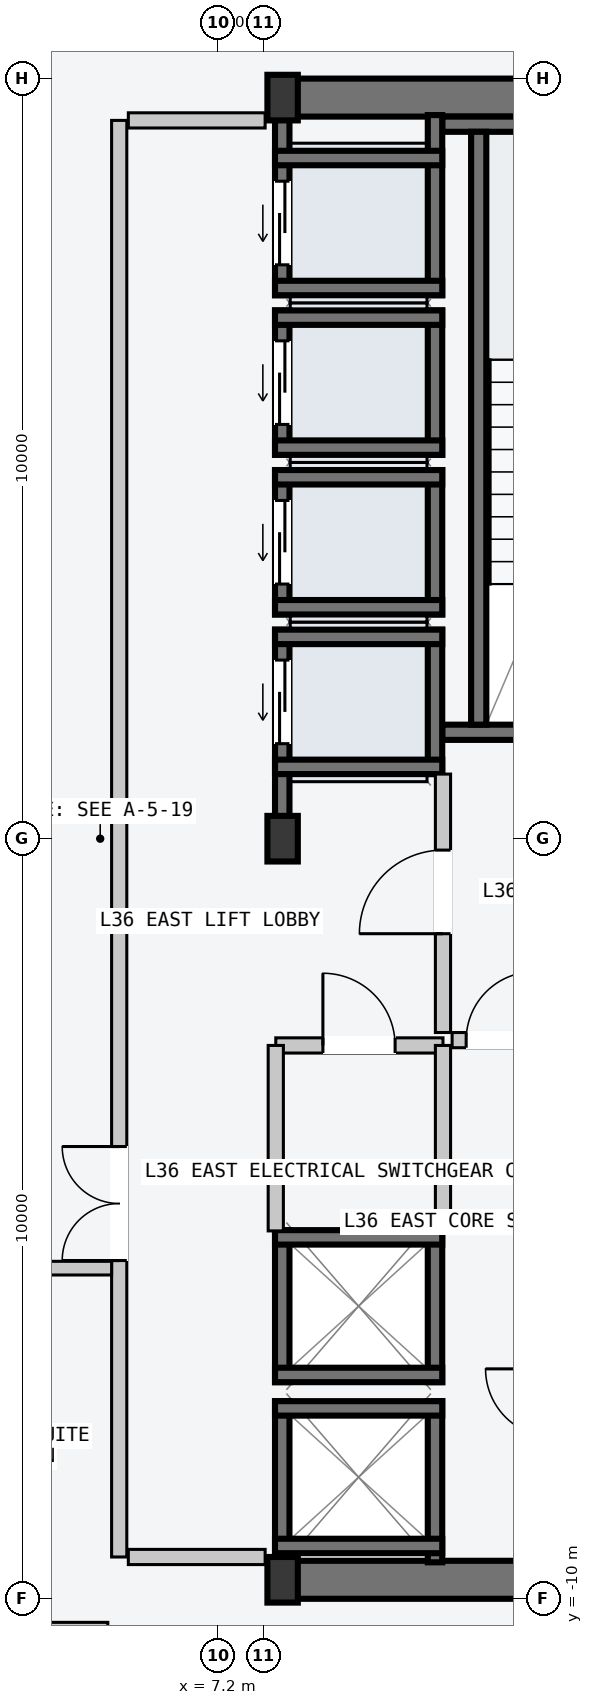
"""IFC4 building model, lengths in metres.
Left out: names, types, materials, properties, quantities, classifications, styles, units other than length and angle.
Written with IfcOpenShell. Run it as: python <this file> out.ifc"""

import sys

from ifc_helpers import new_model, si_unit, direction, frame, frame_2d, origin, origin_2d, place, context, subcontext, project, spatial, rectangle, i_section, extrude, element, fill, save


model = new_model("IFC4")
c1 = context("Model", 3, precision=1e-05, world=origin(), true_north=direction((0.0, 1.0)))
c2 = subcontext(c1, "Body", "Model", "MODEL_VIEW")
j1 = project(units=[si_unit("LENGTHUNIT", "METRE"), si_unit("PLANEANGLEUNIT", "RADIAN")], contexts=[c1])
p1 = place(None, origin())
s1 = spatial("IfcSite", under=j1, at=p1, CompositionType="ELEMENT")
p2 = place(p1, origin())
s2 = spatial("IfcBuilding", under=s1, at=p2, CompositionType="ELEMENT")
p3 = place(p2, frame((0.0, 0.0, 138.6)))
s3 = spatial("IfcBuildingStorey", under=s2, at=p3, CompositionType="ELEMENT", Elevation=138.6)
for number, where, z_axis, x_axis in (
    (1, (8.07, -9.75, -0.2), (0.0, 0.0, 1.0), (1.0, 0.0, 0.0)),
    (2, (8.07, 9.75, -0.2), (0.0, 0.0, 1.0), (1.0, 0.0, 0.0)),
):
    element("IfcWall", number, at=place(p3, frame(where, z_axis=z_axis, x_axis=x_axis)), inside=s3, PredefinedType="SHEAR", context=c2, shape_type="SweptSolid", body=[
        extrude(rectangle(XDim=6.46, YDim=0.5, at=frame_2d((3.23, 0.0))), origin(), (0.0, 0.0, 1.0), 3.6),
    ])
p4 = place(p3, frame((10.15, 1.4, -0.2), z_axis=(0.0, 0.0, 1.0), x_axis=(1.0, 0.0, 0.0)))
e3 = element("IfcWall", 3, at=p4, inside=s3, PredefinedType="SOLIDWALL", context=c2, shape_type="SweptSolid", body=[
    extrude(rectangle(XDim=4.1, YDim=0.2, at=frame_2d((2.05, 0.0))), origin(), (0.0, 0.0, 1.0), 3.6),
])
p5 = place(p4, frame((1.5, 0.0, 0.2)))
e4 = element("IfcOpeningElement", 4, at=p5, cuts=e3, PredefinedType="OPENING", context=c2, shape_type="SweptSolid", body=[
    extrude(rectangle(XDim=1.12, YDim=2.18, at=frame_2d((0.56, 1.09))), frame((0.0, 0.11, 0.0), z_axis=(0.0, -1.0, 0.0), x_axis=(1.0, 0.0, 0.0)), (0.0, 0.0, 1.0), 0.22),
])
p6 = place(p3, frame((10.15, 9.4, -0.2), z_axis=(0.0, 0.0, 1.0), x_axis=(1.0, 0.0, 0.0)))
e5 = element("IfcWall", 5, at=p6, inside=s3, PredefinedType="SOLIDWALL", context=c2, shape_type="SweptSolid", body=[
    extrude(rectangle(XDim=4.1, YDim=0.2, at=frame_2d((2.05, 0.0))), origin(), (0.0, 0.0, 1.0), 3.6),
])
p7 = place(p3, frame((10.63, 1.5, -0.2), z_axis=(0.0, 0.0, 1.0), x_axis=(0.0, 1.0, 0.0)))
e6 = element("IfcWall", 6, at=p7, inside=s3, PredefinedType="SOLIDWALL", context=c2, shape_type="SweptSolid", body=[
    extrude(rectangle(XDim=7.8, YDim=0.2, at=frame_2d((3.9, 0.0))), origin(), (0.0, 0.0, 1.0), 3.6),
])
for number, where, z_axis, x_axis in (
    (7, (8.05, -9.75, 0.0), (0.0, 0.0, 1.0), (1.0, 0.0, 0.0)),
    (8, (8.05, 0.0, 0.0), (0.0, 0.0, 1.0), (1.0, 0.0, 0.0)),
    (9, (8.05, 9.75, 0.0), (0.0, 0.0, 1.0), (1.0, 0.0, 0.0)),
):
    element("IfcColumn", number, at=place(p3, frame(where, z_axis=z_axis, x_axis=x_axis)), inside=s3, PredefinedType="COLUMN", context=c2, shape_type="SweptSolid", body=[
        extrude(i_section(OverallWidth=0.4, OverallDepth=0.6, WebThickness=0.022, FlangeThickness=0.036, at=origin_2d()), origin(), (0.0, 0.0, 1.0), 3.6),
    ])
p8 = place(p3, frame((8.045, 0.21, -0.2), z_axis=(0.0, 0.0, 1.0), x_axis=(0.0, 1.0, 0.0)))
e10 = element("IfcWall", 10, at=p8, inside=s3, PredefinedType="SOLIDWALL", context=c2, shape_type="SweptSolid", body=[
    extrude(rectangle(XDim=2.54, YDim=0.19, at=frame_2d((1.27, 0.0))), origin(), (0.0, 0.0, 1.0), 3.6),
])
p9 = place(p8, frame((1.04, 0.0, 0.2)))
e11 = element("IfcOpeningElement", 11, at=p9, cuts=e10, PredefinedType="OPENING", context=c2, shape_type="SweptSolid", body=[
    extrude(rectangle(XDim=1.1, YDim=2.2, at=frame_2d((0.55, 1.1))), frame((0.0, 0.105, 0.0), z_axis=(0.0, -1.0, 0.0), x_axis=(1.0, 0.0, 0.0)), (0.0, 0.0, 1.0), 0.21),
])
p10 = place(p3, frame((10.055, 0.85, -0.2), z_axis=(0.0, 0.0, 1.0), x_axis=(0.0, 1.0, 0.0)))
e12 = element("IfcWall", 12, at=p10, inside=s3, PredefinedType="SOLIDWALL", context=c2, shape_type="SweptSolid", body=[
    extrude(rectangle(XDim=1.9, YDim=0.19, at=frame_2d((0.95, 0.0))), origin(), (0.0, 0.0, 1.0), 3.6),
])
for number, where, z_axis, x_axis in (
    (13, (7.95, 2.655, -0.2), (0.0, 0.0, 1.0), (1.0, 0.0, 0.0)),
    (14, (7.95, 0.945, -0.2), (0.0, 0.0, 1.0), (1.0, 0.0, 0.0)),
):
    element("IfcWall", number, at=place(p3, frame(where, z_axis=z_axis, x_axis=x_axis)), inside=s3, PredefinedType="SOLIDWALL", context=c2, shape_type="SweptSolid", body=[
        extrude(rectangle(XDim=2.2, YDim=0.19, at=frame_2d((1.1, 0.0))), origin(), (0.0, 0.0, 1.0), 3.6),
    ])
p11 = place(p3, frame((8.045, 2.95, -0.2), z_axis=(0.0, 0.0, 1.0), x_axis=(0.0, 1.0, 0.0)))
e15 = element("IfcWall", 15, at=p11, inside=s3, PredefinedType="SOLIDWALL", context=c2, shape_type="SweptSolid", body=[
    extrude(rectangle(XDim=1.9, YDim=0.19, at=frame_2d((0.95, 0.0))), origin(), (0.0, 0.0, 1.0), 3.6),
])
p12 = place(p11, frame((0.4, 0.0, 0.2)))
e16 = element("IfcOpeningElement", 16, at=p12, cuts=e15, PredefinedType="OPENING", context=c2, shape_type="SweptSolid", body=[
    extrude(rectangle(XDim=1.1, YDim=2.2, at=frame_2d((0.55, 1.1))), frame((0.0, 0.105, 0.0), z_axis=(0.0, -1.0, 0.0), x_axis=(1.0, 0.0, 0.0)), (0.0, 0.0, 1.0), 0.21),
])
p13 = place(p3, frame((10.055, 2.95, -0.2), z_axis=(0.0, 0.0, 1.0), x_axis=(0.0, 1.0, 0.0)))
e17 = element("IfcWall", 17, at=p13, inside=s3, PredefinedType="SOLIDWALL", context=c2, shape_type="SweptSolid", body=[
    extrude(rectangle(XDim=1.9, YDim=0.19, at=frame_2d((0.95, 0.0))), origin(), (0.0, 0.0, 1.0), 3.6),
])
for number, where, z_axis, x_axis in (
    (18, (7.95, 4.755, -0.2), (0.0, 0.0, 1.0), (1.0, 0.0, 0.0)),
    (19, (7.95, 3.045, -0.2), (0.0, 0.0, 1.0), (1.0, 0.0, 0.0)),
):
    element("IfcWall", number, at=place(p3, frame(where, z_axis=z_axis, x_axis=x_axis)), inside=s3, PredefinedType="SOLIDWALL", context=c2, shape_type="SweptSolid", body=[
        extrude(rectangle(XDim=2.2, YDim=0.19, at=frame_2d((1.1, 0.0))), origin(), (0.0, 0.0, 1.0), 3.6),
    ])
p14 = place(p3, frame((8.045, 5.05, -0.2), z_axis=(0.0, 0.0, 1.0), x_axis=(0.0, 1.0, 0.0)))
e20 = element("IfcWall", 20, at=p14, inside=s3, PredefinedType="SOLIDWALL", context=c2, shape_type="SweptSolid", body=[
    extrude(rectangle(XDim=1.9, YDim=0.19, at=frame_2d((0.95, 0.0))), origin(), (0.0, 0.0, 1.0), 3.6),
])
p15 = place(p14, frame((0.4, 0.0, 0.2)))
e21 = element("IfcOpeningElement", 21, at=p15, cuts=e20, PredefinedType="OPENING", context=c2, shape_type="SweptSolid", body=[
    extrude(rectangle(XDim=1.1, YDim=2.2, at=frame_2d((0.55, 1.1))), frame((0.0, 0.105, 0.0), z_axis=(0.0, -1.0, 0.0), x_axis=(1.0, 0.0, 0.0)), (0.0, 0.0, 1.0), 0.21),
])
p16 = place(p3, frame((10.055, 5.05, -0.2), z_axis=(0.0, 0.0, 1.0), x_axis=(0.0, 1.0, 0.0)))
e22 = element("IfcWall", 22, at=p16, inside=s3, PredefinedType="SOLIDWALL", context=c2, shape_type="SweptSolid", body=[
    extrude(rectangle(XDim=1.9, YDim=0.19, at=frame_2d((0.95, 0.0))), origin(), (0.0, 0.0, 1.0), 3.6),
])
for number, where, z_axis, x_axis in (
    (23, (7.95, 6.855, -0.2), (0.0, 0.0, 1.0), (1.0, 0.0, 0.0)),
    (24, (7.95, 5.145, -0.2), (0.0, 0.0, 1.0), (1.0, 0.0, 0.0)),
):
    element("IfcWall", number, at=place(p3, frame(where, z_axis=z_axis, x_axis=x_axis)), inside=s3, PredefinedType="SOLIDWALL", context=c2, shape_type="SweptSolid", body=[
        extrude(rectangle(XDim=2.2, YDim=0.19, at=frame_2d((1.1, 0.0))), origin(), (0.0, 0.0, 1.0), 3.6),
    ])
p17 = place(p3, frame((8.045, 7.15, -0.2), z_axis=(0.0, 0.0, 1.0), x_axis=(0.0, 1.0, 0.0)))
e25 = element("IfcWall", 25, at=p17, inside=s3, PredefinedType="SOLIDWALL", context=c2, shape_type="SweptSolid", body=[
    extrude(rectangle(XDim=2.37, YDim=0.19, at=frame_2d((1.185, 0.0))), origin(), (0.0, 0.0, 1.0), 3.6),
])
p18 = place(p17, frame((0.4, 0.0, 0.2)))
e26 = element("IfcOpeningElement", 26, at=p18, cuts=e25, PredefinedType="OPENING", context=c2, shape_type="SweptSolid", body=[
    extrude(rectangle(XDim=1.1, YDim=2.2, at=frame_2d((0.55, 1.1))), frame((0.0, 0.105, 0.0), z_axis=(0.0, -1.0, 0.0), x_axis=(1.0, 0.0, 0.0)), (0.0, 0.0, 1.0), 0.21),
])
p19 = place(p3, frame((10.055, 7.15, -0.2), z_axis=(0.0, 0.0, 1.0), x_axis=(0.0, 1.0, 0.0)))
e27 = element("IfcWall", 27, at=p19, inside=s3, PredefinedType="SOLIDWALL", context=c2, shape_type="SweptSolid", body=[
    extrude(rectangle(XDim=2.37, YDim=0.19, at=frame_2d((1.185, 0.0))), origin(), (0.0, 0.0, 1.0), 3.6),
])
for number, where, z_axis, x_axis in (
    (28, (7.95, 8.955, -0.2), (0.0, 0.0, 1.0), (1.0, 0.0, 0.0)),
    (29, (7.95, 7.245, -0.2), (0.0, 0.0, 1.0), (1.0, 0.0, 0.0)),
):
    element("IfcWall", number, at=place(p3, frame(where, z_axis=z_axis, x_axis=x_axis)), inside=s3, PredefinedType="SOLIDWALL", context=c2, shape_type="SweptSolid", body=[
        extrude(rectangle(XDim=2.2, YDim=0.19, at=frame_2d((1.1, 0.0))), origin(), (0.0, 0.0, 1.0), 3.6),
    ])
for number, where, z_axis, x_axis in (
    (30, (8.045, -9.52, -0.2), (0.0, 0.0, 1.0), (0.0, 1.0, 0.0)),
    (31, (10.055, -9.52, -0.2), (0.0, 0.0, 1.0), (0.0, 1.0, 0.0)),
):
    element("IfcWall", number, at=place(p3, frame(where, z_axis=z_axis, x_axis=x_axis)), inside=s3, PredefinedType="SOLIDWALL", context=c2, shape_type="SweptSolid", body=[
        extrude(rectangle(XDim=2.12, YDim=0.19, at=frame_2d((1.06, 0.0))), origin(), (0.0, 0.0, 1.0), 3.6),
    ])
for number, where, z_axis, x_axis in (
    (32, (7.95, -7.495, -0.2), (0.0, 0.0, 1.0), (1.0, 0.0, 0.0)),
    (33, (7.95, -9.305, -0.2), (0.0, 0.0, 1.0), (1.0, 0.0, 0.0)),
):
    element("IfcWall", number, at=place(p3, frame(where, z_axis=z_axis, x_axis=x_axis)), inside=s3, PredefinedType="SOLIDWALL", context=c2, shape_type="SweptSolid", body=[
        extrude(rectangle(XDim=2.2, YDim=0.19, at=frame_2d((1.1, 0.0))), origin(), (0.0, 0.0, 1.0), 3.6),
    ])
for number, where, z_axis, x_axis in (
    (34, (8.045, -7.15, -0.2), (0.0, 0.0, 1.0), (0.0, 1.0, 0.0)),
    (35, (10.055, -7.15, -0.2), (0.0, 0.0, 1.0), (0.0, 1.0, 0.0)),
):
    element("IfcWall", number, at=place(p3, frame(where, z_axis=z_axis, x_axis=x_axis)), inside=s3, PredefinedType="SOLIDWALL", context=c2, shape_type="SweptSolid", body=[
        extrude(rectangle(XDim=2.0, YDim=0.19, at=frame_2d((1.0, 0.0))), origin(), (0.0, 0.0, 1.0), 3.6),
    ])
for number, where, z_axis, x_axis in (
    (36, (7.95, -5.245, -0.2), (0.0, 0.0, 1.0), (1.0, 0.0, 0.0)),
    (37, (7.95, -7.055, -0.2), (0.0, 0.0, 1.0), (1.0, 0.0, 0.0)),
):
    element("IfcWall", number, at=place(p3, frame(where, z_axis=z_axis, x_axis=x_axis)), inside=s3, PredefinedType="SOLIDWALL", context=c2, shape_type="SweptSolid", body=[
        extrude(rectangle(XDim=2.2, YDim=0.19, at=frame_2d((1.1, 0.0))), origin(), (0.0, 0.0, 1.0), 3.6),
    ])
p20 = place(p3, frame((5.9, -9.45, 0.0), z_axis=(0.0, 0.0, 1.0), x_axis=(0.0, 1.0, 0.0)))
e38 = element("IfcWall", 38, at=p20, inside=s3, PredefinedType="PARTITIONING", context=c2, shape_type="SweptSolid", body=[
    extrude(rectangle(XDim=18.9, YDim=0.2, at=frame_2d((9.45, 0.0))), origin(), (0.0, 0.0, 1.0), 3.4),
])
p21 = place(p20, frame((3.9, 0.0, 0.0)))
e39 = element("IfcOpeningElement", 39, at=p21, cuts=e38, PredefinedType="OPENING", context=c2, shape_type="SweptSolid", body=[
    extrude(rectangle(XDim=1.5, YDim=2.2, at=frame_2d((0.75, 1.1))), frame((0.0, 0.11, 0.0), z_axis=(0.0, -1.0, 0.0), x_axis=(1.0, 0.0, 0.0)), (0.0, 0.0, 1.0), 0.22),
])
for number, where, z_axis, x_axis in (
    (40, (6.02, -9.45, 0.0), (0.0, 0.0, 1.0), (1.0, 0.0, 0.0)),
    (41, (6.02, 9.45, 0.0), (0.0, 0.0, 1.0), (1.0, 0.0, 0.0)),
):
    element("IfcWall", number, at=place(p3, frame(where, z_axis=z_axis, x_axis=x_axis)), inside=s3, PredefinedType="PARTITIONING", context=c2, shape_type="SweptSolid", body=[
        extrude(rectangle(XDim=1.8, YDim=0.2, at=frame_2d((0.9, 0.0))), origin(), (0.0, 0.0, 1.0), 3.4),
    ])
p22 = place(p3, frame((10.16, -2.55, 0.0), z_axis=(0.0, 0.0, 1.0), x_axis=(0.0, 1.0, 0.0)))
e42 = element("IfcWall", 42, at=p22, inside=s3, PredefinedType="PARTITIONING", context=c2, shape_type="SweptSolid", body=[
    extrude(rectangle(XDim=3.4, YDim=0.2, at=frame_2d((1.7, 0.0))), origin(), (0.0, 0.0, 1.0), 3.4),
])
p23 = place(p22, frame((1.3, 0.0, 0.0)))
e43 = element("IfcOpeningElement", 43, at=p23, cuts=e42, PredefinedType="OPENING", context=c2, shape_type="SweptSolid", body=[
    extrude(rectangle(XDim=1.1, YDim=2.15, at=frame_2d((0.55, 1.075))), frame((0.0, 0.11, 0.0), z_axis=(0.0, -1.0, 0.0), x_axis=(1.0, 0.0, 0.0)), (0.0, 0.0, 1.0), 0.22),
])
p24 = place(p3, frame((10.28, -2.65, 0.0), z_axis=(0.0, 0.0, 1.0), x_axis=(1.0, 0.0, 0.0)))
e44 = element("IfcWall", 44, at=p24, inside=s3, PredefinedType="PARTITIONING", context=c2, shape_type="SweptSolid", body=[
    extrude(rectangle(XDim=1.27, YDim=0.2, at=frame_2d((0.635, 0.0))), origin(), (0.0, 0.0, 1.0), 3.4),
])
p25 = place(p24, frame((0.185, 0.0, 0.0)))
e45 = element("IfcOpeningElement", 45, at=p25, cuts=e44, PredefinedType="OPENING", context=c2, shape_type="SweptSolid", body=[
    extrude(rectangle(XDim=0.9, YDim=2.15, at=frame_2d((0.45, 1.075))), frame((0.0, 0.11, 0.0), z_axis=(0.0, -1.0, 0.0), x_axis=(1.0, 0.0, 0.0)), (0.0, 0.0, 1.0), 0.22),
])
p26 = place(p3, frame((7.96, -2.72, 0.0), z_axis=(0.0, 0.0, 1.0), x_axis=(1.0, 0.0, 0.0)))
e46 = element("IfcWall", 46, at=p26, inside=s3, PredefinedType="PARTITIONING", context=c2, shape_type="SweptSolid", body=[
    extrude(rectangle(XDim=2.2, YDim=0.2, at=frame_2d((1.1, 0.0))), origin(), (0.0, 0.0, 1.0), 3.4),
])
p27 = place(p26, frame((0.62, 0.0, 0.0)))
e47 = element("IfcOpeningElement", 47, at=p27, cuts=e46, PredefinedType="OPENING", context=c2, shape_type="SweptSolid", body=[
    extrude(rectangle(XDim=0.95, YDim=2.1, at=frame_2d((0.475, 1.05))), frame((0.0, 0.11, 0.0), z_axis=(0.0, -1.0, 0.0), x_axis=(1.0, 0.0, 0.0)), (0.0, 0.0, 1.0), 0.22),
])
for number, where, z_axis, x_axis in (
    (48, (7.96, -5.16, 0.0), (0.0, 0.0, 1.0), (0.0, 1.0, 0.0)),
    (49, (10.16, -5.16, 0.0), (0.0, 0.0, 1.0), (0.0, 1.0, 0.0)),
):
    element("IfcWall", number, at=place(p3, frame(where, z_axis=z_axis, x_axis=x_axis)), inside=s3, PredefinedType="PARTITIONING", context=c2, shape_type="SweptSolid", body=[
        extrude(rectangle(XDim=2.44, YDim=0.2, at=frame_2d((1.22, 0.0))), origin(), (0.0, 0.0, 1.0), 3.4),
    ])
p28 = place(p3, frame((-5.8, -5.65, 0.0), z_axis=(0.0, 0.0, 1.0), x_axis=(1.0, 0.0, 0.0)))
e50 = element("IfcWall", 50, at=p28, inside=s3, PredefinedType="PARTITIONING", context=c2, shape_type="SweptSolid", body=[
    extrude(rectangle(XDim=11.6, YDim=0.18, at=frame_2d((5.8, 0.0))), origin(), (0.0, 0.0, 1.0), 3.4),
])
p29 = place(p28, frame((5.1, 0.0, 0.0)))
e51 = element("IfcOpeningElement", 51, at=p29, cuts=e50, PredefinedType="OPENING", context=c2, shape_type="SweptSolid", body=[
    extrude(rectangle(XDim=1.4, YDim=2.2, at=frame_2d((0.7, 1.1))), frame((0.0, 0.1, 0.0), z_axis=(0.0, -1.0, 0.0), x_axis=(1.0, 0.0, 0.0)), (0.0, 0.0, 1.0), 0.2),
])
p30 = place(p3, frame((-5.75, -10.4, 0.0), z_axis=(0.0, 0.0, 1.0), x_axis=(1.0, 0.0, 0.0)))
e52 = element("IfcWall", 52, at=p30, inside=s3, PredefinedType="PARTITIONING", context=c2, shape_type="SweptSolid", body=[
    extrude(rectangle(XDim=11.5, YDim=0.18, at=frame_2d((5.75, 0.0))), origin(), (0.0, 0.0, 1.0), 3.4),
])
p31 = place(p30, frame((4.542, 0.0, 0.0)))
e53 = element("IfcOpeningElement", 53, at=p31, cuts=e52, PredefinedType="OPENING", context=c2, shape_type="SweptSolid", body=[
    extrude(rectangle(XDim=1.4, YDim=2.2, at=frame_2d((0.7, 1.1))), frame((0.0, 0.1, 0.0), z_axis=(0.0, -1.0, 0.0), x_axis=(1.0, 0.0, 0.0)), (0.0, 0.0, 1.0), 0.2),
])
p32 = place(p9, origin())
e54 = element("IfcDoor", 54, at=p32, inside=s3, OperationType="SLIDING_TO_LEFT", PredefinedType="DOOR", context=c2, shape_type="SweptSolid", body=[
    extrude(rectangle(XDim=1.1, YDim=2.2, at=frame_2d((0.55, 1.1))), frame((0.0, 0.025, 0.0), z_axis=(0.0, -1.0, 0.0), x_axis=(1.0, 0.0, 0.0)), (0.0, 0.0, 1.0), 0.05),
])
fill(e11, e54)
p33 = place(p12, origin())
e55 = element("IfcDoor", 55, at=p33, inside=s3, OperationType="SLIDING_TO_LEFT", PredefinedType="DOOR", context=c2, shape_type="SweptSolid", body=[
    extrude(rectangle(XDim=1.1, YDim=2.2, at=frame_2d((0.55, 1.1))), frame((0.0, 0.025, 0.0), z_axis=(0.0, -1.0, 0.0), x_axis=(1.0, 0.0, 0.0)), (0.0, 0.0, 1.0), 0.05),
])
fill(e16, e55)
p34 = place(p15, origin())
e56 = element("IfcDoor", 56, at=p34, inside=s3, OperationType="SLIDING_TO_LEFT", PredefinedType="DOOR", context=c2, shape_type="SweptSolid", body=[
    extrude(rectangle(XDim=1.1, YDim=2.2, at=frame_2d((0.55, 1.1))), frame((0.0, 0.025, 0.0), z_axis=(0.0, -1.0, 0.0), x_axis=(1.0, 0.0, 0.0)), (0.0, 0.0, 1.0), 0.05),
])
fill(e21, e56)
p35 = place(p18, origin())
e57 = element("IfcDoor", 57, at=p35, inside=s3, OperationType="SLIDING_TO_LEFT", PredefinedType="DOOR", context=c2, shape_type="SweptSolid", body=[
    extrude(rectangle(XDim=1.1, YDim=2.2, at=frame_2d((0.55, 1.1))), frame((0.0, 0.025, 0.0), z_axis=(0.0, -1.0, 0.0), x_axis=(1.0, 0.0, 0.0)), (0.0, 0.0, 1.0), 0.05),
])
fill(e26, e57)
p36 = place(p21, origin())
e58 = element("IfcDoor", 58, at=p36, inside=s3, OperationType="DOUBLE_DOOR_SINGLE_SWING", PredefinedType="DOOR", context=c2, shape_type="SweptSolid", body=[
    extrude(rectangle(XDim=1.5, YDim=2.2, at=frame_2d((0.75, 1.1))), frame((0.0, 0.025, 0.0), z_axis=(0.0, -1.0, 0.0), x_axis=(1.0, 0.0, 0.0)), (0.0, 0.0, 1.0), 0.05),
])
fill(e39, e58)
p37 = place(p23, origin())
e59 = element("IfcDoor", 59, at=p37, inside=s3, OperationType="SINGLE_SWING_LEFT", PredefinedType="DOOR", context=c2, shape_type="SweptSolid", body=[
    extrude(rectangle(XDim=1.1, YDim=2.15, at=frame_2d((0.55, 1.075))), frame((0.0, 0.025, 0.0), z_axis=(0.0, -1.0, 0.0), x_axis=(1.0, 0.0, 0.0)), (0.0, 0.0, 1.0), 0.05),
])
fill(e43, e59)
p38 = place(p25, origin())
e60 = element("IfcDoor", 60, at=p38, inside=s3, OperationType="SINGLE_SWING_RIGHT", PredefinedType="DOOR", context=c2, shape_type="SweptSolid", body=[
    extrude(rectangle(XDim=0.9, YDim=2.15, at=frame_2d((0.45, 1.075))), frame((0.0, 0.025, 0.0), z_axis=(0.0, -1.0, 0.0), x_axis=(1.0, 0.0, 0.0)), (0.0, 0.0, 1.0), 0.05),
])
fill(e45, e60)
p39 = place(p27, origin())
e61 = element("IfcDoor", 61, at=p39, inside=s3, OperationType="SINGLE_SWING_LEFT", PredefinedType="DOOR", context=c2, shape_type="SweptSolid", body=[
    extrude(rectangle(XDim=0.95, YDim=2.1, at=frame_2d((0.475, 1.05))), frame((0.0, 0.025, 0.0), z_axis=(0.0, -1.0, 0.0), x_axis=(1.0, 0.0, 0.0)), (0.0, 0.0, 1.0), 0.05),
])
fill(e47, e61)
save(model, sys.argv[1])
